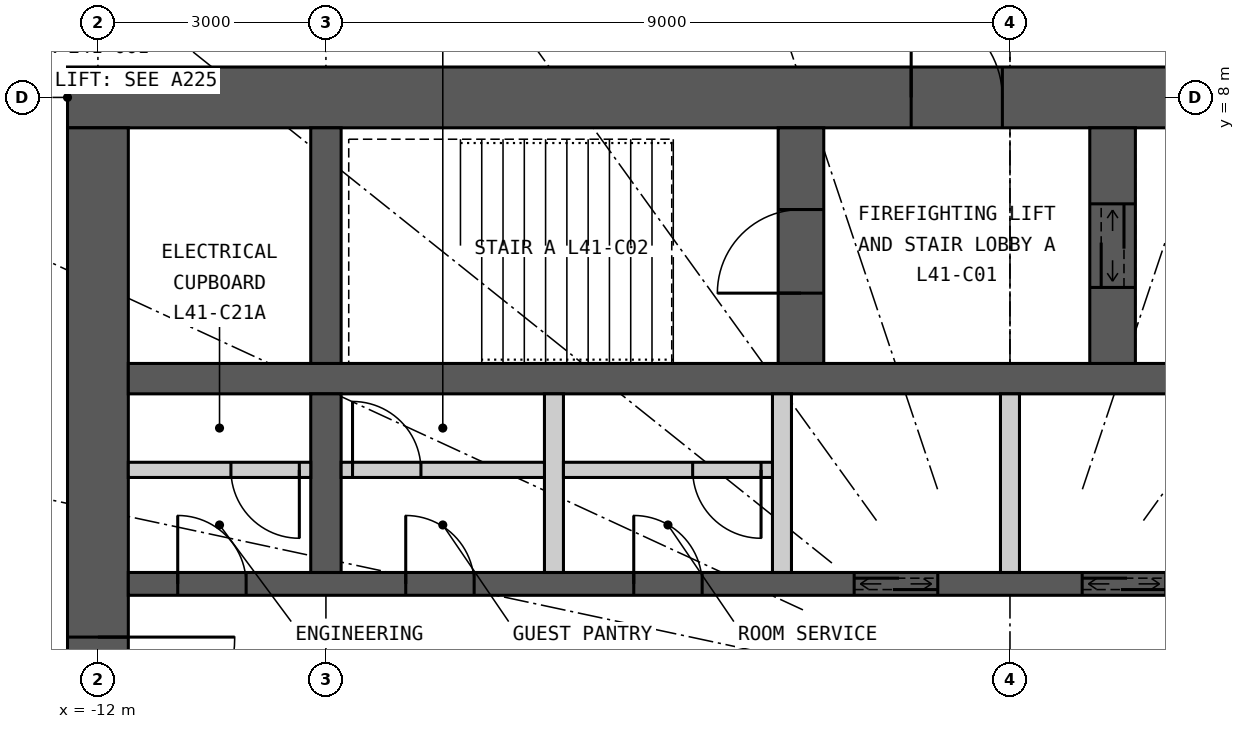
"""IFC4 building model, lengths in metres.
Left out: names, types, materials, properties, quantities, classifications, styles, units other than length and angle.
Written with IfcOpenShell. Run it as: python <this file> out.ifc"""

import sys

from ifc_helpers import new_model, si_unit, direction, frame, frame_2d, origin, place, context, subcontext, project, spatial, rectangle, extrude, element, fill, save


model = new_model("IFC4")
c1 = context("Model", 3, precision=1e-05, world=origin(), true_north=direction((0.0, 1.0)))
c2 = subcontext(c1, "Body", "Model", "MODEL_VIEW")
j1 = project(units=[si_unit("LENGTHUNIT", "METRE"), si_unit("PLANEANGLEUNIT", "RADIAN")], contexts=[c1])
p1 = place(None, origin())
s1 = spatial("IfcSite", under=j1, at=p1, CompositionType="ELEMENT")
p2 = place(p1, origin())
s2 = spatial("IfcBuilding", under=s1, at=p2, CompositionType="ELEMENT")
p3 = place(p2, frame((0.0, 0.0, 156.6)))
s3 = spatial("IfcBuildingStorey", under=s2, at=p3, CompositionType="ELEMENT", Elevation=156.6)
p4 = place(p3, frame((-12.4, 8.0, 0.0), z_axis=(0.0, 0.0, 1.0), x_axis=(1.0, 0.0, 0.0)))
e1 = element("IfcWall", 1, at=p4, inside=s3, PredefinedType="SHEAR", context=c2, shape_type="SweptSolid", body=[
    extrude(rectangle(XDim=24.8, YDim=0.8, at=frame_2d((12.4, 0.0))), origin(), (0.0, 0.0, 1.0), 3.3),
])
p5 = place(p4, frame((11.1, 0.0, 0.0)))
e2 = element("IfcOpeningElement", 2, at=p5, cuts=e1, PredefinedType="OPENING", context=c2, shape_type="SweptSolid", body=[
    extrude(rectangle(XDim=1.2, YDim=2.2, at=frame_2d((0.6, 1.1))), frame((0.0, 0.41, 0.0), z_axis=(0.0, -1.0, 0.0), x_axis=(1.0, 0.0, 0.0)), (0.0, 0.0, 1.0), 0.82),
])
p6 = place(p4, frame((18.7, 0.0, 0.0)))
e3 = element("IfcOpeningElement", 3, at=p6, cuts=e1, PredefinedType="OPENING", context=c2, shape_type="SweptSolid", body=[
    extrude(rectangle(XDim=0.9, YDim=2.2, at=frame_2d((0.45, 1.1))), frame((0.0, 0.41, 0.0), z_axis=(0.0, -1.0, 0.0), x_axis=(1.0, 0.0, 0.0)), (0.0, 0.0, 1.0), 0.82),
])
p7 = place(p3, frame((-12.0, 7.6, 0.0), z_axis=(0.0, 0.0, 1.0), x_axis=(0.0, -1.0, 0.0)))
e4 = element("IfcWall", 4, at=p7, inside=s3, PredefinedType="SHEAR", context=c2, shape_type="SweptSolid", body=[
    extrude(rectangle(XDim=15.2, YDim=0.8, at=frame_2d((7.6, 0.0))), origin(), (0.0, 0.0, 1.0), 3.3),
])
p8 = place(p7, frame((6.7, 0.0, 0.0)))
e5 = element("IfcOpeningElement", 5, at=p8, cuts=e4, PredefinedType="OPENING", context=c2, shape_type="SweptSolid", body=[
    extrude(rectangle(XDim=1.8, YDim=2.2, at=frame_2d((0.9, 1.1))), frame((0.0, 0.41, 0.0), z_axis=(0.0, -1.0, 0.0), x_axis=(1.0, 0.0, 0.0)), (0.0, 0.0, 1.0), 0.82),
])
p9 = place(p3, frame((-11.6, 4.3, 0.0), z_axis=(0.0, 0.0, 1.0), x_axis=(1.0, 0.0, 0.0)))
e6 = element("IfcWall", 6, at=p9, inside=s3, PredefinedType="SHEAR", context=c2, shape_type="SweptSolid", body=[
    extrude(rectangle(XDim=23.2, YDim=0.4, at=frame_2d((11.6, 0.0))), origin(), (0.0, 0.0, 1.0), 3.3),
])
p10 = place(p3, frame((-11.6, 1.6, 0.0), z_axis=(0.0, 0.0, 1.0), x_axis=(1.0, 0.0, 0.0)))
e7 = element("IfcWall", 7, at=p10, inside=s3, PredefinedType="SHEAR", context=c2, shape_type="SweptSolid", body=[
    extrude(rectangle(XDim=23.2, YDim=0.3, at=frame_2d((11.6, 0.0))), origin(), (0.0, 0.0, 1.0), 3.3),
])
p11 = place(p10, frame((9.55, 0.0, 0.0)))
e8 = element("IfcOpeningElement", 8, at=p11, cuts=e7, PredefinedType="OPENING", context=c2, shape_type="SweptSolid", body=[
    extrude(rectangle(XDim=1.1, YDim=2.2, at=frame_2d((0.55, 1.1))), frame((0.0, 0.16, 0.0), z_axis=(0.0, -1.0, 0.0), x_axis=(1.0, 0.0, 0.0)), (0.0, 0.0, 1.0), 0.32),
])
p12 = place(p10, frame((12.55, 0.0, 0.0)))
e9 = element("IfcOpeningElement", 9, at=p12, cuts=e7, PredefinedType="OPENING", context=c2, shape_type="SweptSolid", body=[
    extrude(rectangle(XDim=1.1, YDim=2.2, at=frame_2d((0.55, 1.1))), frame((0.0, 0.16, 0.0), z_axis=(0.0, -1.0, 0.0), x_axis=(1.0, 0.0, 0.0)), (0.0, 0.0, 1.0), 0.32),
])
p13 = place(p10, frame((0.65, 0.0, 0.0)))
e10 = element("IfcOpeningElement", 10, at=p13, cuts=e7, PredefinedType="OPENING", context=c2, shape_type="SweptSolid", body=[
    extrude(rectangle(XDim=0.9, YDim=2.2, at=frame_2d((0.45, 1.1))), frame((0.0, 0.16, 0.0), z_axis=(0.0, -1.0, 0.0), x_axis=(1.0, 0.0, 0.0)), (0.0, 0.0, 1.0), 0.32),
])
p14 = place(p10, frame((21.65, 0.0, 0.0)))
e11 = element("IfcOpeningElement", 11, at=p14, cuts=e7, PredefinedType="OPENING", context=c2, shape_type="SweptSolid", body=[
    extrude(rectangle(XDim=0.9, YDim=2.2, at=frame_2d((0.45, 1.1))), frame((0.0, 0.16, 0.0), z_axis=(0.0, -1.0, 0.0), x_axis=(1.0, 0.0, 0.0)), (0.0, 0.0, 1.0), 0.32),
])
p15 = place(p10, frame((3.65, 0.0, 0.0)))
e12 = element("IfcOpeningElement", 12, at=p15, cuts=e7, PredefinedType="OPENING", context=c2, shape_type="SweptSolid", body=[
    extrude(rectangle(XDim=0.9, YDim=2.2, at=frame_2d((0.45, 1.1))), frame((0.0, 0.16, 0.0), z_axis=(0.0, -1.0, 0.0), x_axis=(1.0, 0.0, 0.0)), (0.0, 0.0, 1.0), 0.32),
])
p16 = place(p10, frame((6.65, 0.0, 0.0)))
e13 = element("IfcOpeningElement", 13, at=p16, cuts=e7, PredefinedType="OPENING", context=c2, shape_type="SweptSolid", body=[
    extrude(rectangle(XDim=0.9, YDim=2.2, at=frame_2d((0.45, 1.1))), frame((0.0, 0.16, 0.0), z_axis=(0.0, -1.0, 0.0), x_axis=(1.0, 0.0, 0.0)), (0.0, 0.0, 1.0), 0.32),
])
p17 = place(p3, frame((-9.0, 4.5, 0.0), z_axis=(0.0, 0.0, 1.0), x_axis=(0.0, 1.0, 0.0)))
e14 = element("IfcWall", 14, at=p17, inside=s3, PredefinedType="SHEAR", context=c2, shape_type="SweptSolid", body=[
    extrude(rectangle(XDim=3.1, YDim=0.4, at=frame_2d((1.55, 0.0))), origin(), (0.0, 0.0, 1.0), 3.3),
])
p18 = place(p3, frame((-9.0, 1.75, 0.0), z_axis=(0.0, 0.0, 1.0), x_axis=(0.0, 1.0, 0.0)))
e15 = element("IfcWall", 15, at=p18, inside=s3, PredefinedType="SHEAR", context=c2, shape_type="SweptSolid", body=[
    extrude(rectangle(XDim=2.35, YDim=0.4, at=frame_2d((1.175, 0.0))), origin(), (0.0, 0.0, 1.0), 3.3),
])
p19 = place(p3, frame((-2.75, 4.5, 0.0), z_axis=(0.0, 0.0, 1.0), x_axis=(0.0, 1.0, 0.0)))
e16 = element("IfcWall", 16, at=p19, inside=s3, PredefinedType="SHEAR", context=c2, shape_type="SweptSolid", body=[
    extrude(rectangle(XDim=3.1, YDim=0.6, at=frame_2d((1.55, 0.0))), origin(), (0.0, 0.0, 1.0), 3.3),
])
p20 = place(p19, frame((0.925, 0.0, 0.0)))
e17 = element("IfcOpeningElement", 17, at=p20, cuts=e16, PredefinedType="OPENING", context=c2, shape_type="SweptSolid", body=[
    extrude(rectangle(XDim=1.1, YDim=2.2, at=frame_2d((0.55, 1.1))), frame((0.0, 0.31, 0.0), z_axis=(0.0, -1.0, 0.0), x_axis=(1.0, 0.0, 0.0)), (0.0, 0.0, 1.0), 0.62),
])
p21 = place(p3, frame((1.35, 4.5, 0.0), z_axis=(0.0, 0.0, 1.0), x_axis=(0.0, 1.0, 0.0)))
e18 = element("IfcWall", 18, at=p21, inside=s3, PredefinedType="SHEAR", context=c2, shape_type="SweptSolid", body=[
    extrude(rectangle(XDim=3.1, YDim=0.6, at=frame_2d((1.55, 0.0))), origin(), (0.0, 0.0, 1.0), 3.3),
])
p22 = place(p21, frame((1.0, 0.0, 0.0)))
e19 = element("IfcOpeningElement", 19, at=p22, cuts=e18, PredefinedType="OPENING", context=c2, shape_type="SweptSolid", body=[
    extrude(rectangle(XDim=1.1, YDim=2.2, at=frame_2d((0.55, 1.1))), frame((0.0, 0.31, 0.0), z_axis=(0.0, -1.0, 0.0), x_axis=(1.0, 0.0, 0.0)), (0.0, 0.0, 1.0), 0.62),
])
for number, where, z_axis, x_axis in (
    (20, (-6.0, 1.75, 0.0), (0.0, 0.0, 1.0), (0.0, 1.0, 0.0)),
    (21, (-3.0, 1.75, 0.0), (0.0, 0.0, 1.0), (0.0, 1.0, 0.0)),
    (22, (0.0, 1.75, 0.0), (0.0, 0.0, 1.0), (0.0, 1.0, 0.0)),
):
    element("IfcWall", number, at=place(p3, frame(where, z_axis=z_axis, x_axis=x_axis)), inside=s3, PredefinedType="PARTITIONING", context=c2, shape_type="SweptSolid", body=[
        extrude(rectangle(XDim=2.35, YDim=0.25, at=frame_2d((1.175, 0.0))), origin(), (0.0, 0.0, 1.0), 3.3),
    ])
p23 = place(p3, frame((-11.6, 3.1, 0.0), z_axis=(0.0, 0.0, 1.0), x_axis=(1.0, 0.0, 0.0)))
e23 = element("IfcWall", 23, at=p23, inside=s3, PredefinedType="PARTITIONING", context=c2, shape_type="SweptSolid", body=[
    extrude(rectangle(XDim=2.4, YDim=0.2, at=frame_2d((1.2, 0.0))), origin(), (0.0, 0.0, 1.0), 3.12),
])
p24 = place(p23, frame((1.35, 0.0, 0.0)))
e24 = element("IfcOpeningElement", 24, at=p24, cuts=e23, PredefinedType="OPENING", context=c2, shape_type="SweptSolid", body=[
    extrude(rectangle(XDim=0.9, YDim=2.2, at=frame_2d((0.45, 1.1))), frame((0.0, 0.11, 0.0), z_axis=(0.0, -1.0, 0.0), x_axis=(1.0, 0.0, 0.0)), (0.0, 0.0, 1.0), 0.22),
])
p25 = place(p3, frame((-8.8, 3.1, 0.0), z_axis=(0.0, 0.0, 1.0), x_axis=(1.0, 0.0, 0.0)))
e25 = element("IfcWall", 25, at=p25, inside=s3, PredefinedType="PARTITIONING", context=c2, shape_type="SweptSolid", body=[
    extrude(rectangle(XDim=2.675, YDim=0.2, at=frame_2d((1.337, 0.0))), origin(), (0.0, 0.0, 1.0), 3.12),
])
p26 = place(p25, frame((0.15, 0.0, 0.0)))
e26 = element("IfcOpeningElement", 26, at=p26, cuts=e25, PredefinedType="OPENING", context=c2, shape_type="SweptSolid", body=[
    extrude(rectangle(XDim=0.9, YDim=2.2, at=frame_2d((0.45, 1.1))), frame((0.0, 0.11, 0.0), z_axis=(0.0, -1.0, 0.0), x_axis=(1.0, 0.0, 0.0)), (0.0, 0.0, 1.0), 0.22),
])
p27 = place(p3, frame((-5.875, 3.1, 0.0), z_axis=(0.0, 0.0, 1.0), x_axis=(1.0, 0.0, 0.0)))
e27 = element("IfcWall", 27, at=p27, inside=s3, PredefinedType="PARTITIONING", context=c2, shape_type="SweptSolid", body=[
    extrude(rectangle(XDim=2.75, YDim=0.2, at=frame_2d((1.375, 0.0))), origin(), (0.0, 0.0, 1.0), 3.12),
])
p28 = place(p27, frame((1.7, 0.0, 0.0)))
e28 = element("IfcOpeningElement", 28, at=p28, cuts=e27, PredefinedType="OPENING", context=c2, shape_type="SweptSolid", body=[
    extrude(rectangle(XDim=0.9, YDim=2.2, at=frame_2d((0.45, 1.1))), frame((0.0, 0.11, 0.0), z_axis=(0.0, -1.0, 0.0), x_axis=(1.0, 0.0, 0.0)), (0.0, 0.0, 1.0), 0.22),
])
p29 = place(p5, origin())
e29 = element("IfcDoor", 29, at=p29, inside=s3, OperationType="SINGLE_SWING_LEFT", PredefinedType="DOOR", context=c2, shape_type="SweptSolid", body=[
    extrude(rectangle(XDim=1.2, YDim=2.2, at=frame_2d((0.6, 1.1))), frame((0.0, 0.025, 0.0), z_axis=(0.0, -1.0, 0.0), x_axis=(1.0, 0.0, 0.0)), (0.0, 0.0, 1.0), 0.05),
])
fill(e2, e29)
p30 = place(p20, origin())
e30 = element("IfcDoor", 30, at=p30, inside=s3, OperationType="SINGLE_SWING_LEFT", PredefinedType="DOOR", context=c2, shape_type="SweptSolid", body=[
    extrude(rectangle(XDim=1.1, YDim=2.2, at=frame_2d((0.55, 1.1))), frame((0.0, 0.025, 0.0), z_axis=(0.0, -1.0, 0.0), x_axis=(1.0, 0.0, 0.0)), (0.0, 0.0, 1.0), 0.05),
])
fill(e17, e30)
p31 = place(p22, origin())
e31 = element("IfcDoor", 31, at=p31, inside=s3, OperationType="DOUBLE_DOOR_SLIDING", PredefinedType="DOOR", context=c2, shape_type="SweptSolid", body=[
    extrude(rectangle(XDim=1.1, YDim=2.2, at=frame_2d((0.55, 1.1))), frame((0.0, 0.025, 0.0), z_axis=(0.0, -1.0, 0.0), x_axis=(1.0, 0.0, 0.0)), (0.0, 0.0, 1.0), 0.05),
])
fill(e19, e31)
p32 = place(p11, origin())
e32 = element("IfcDoor", 32, at=p32, inside=s3, OperationType="DOUBLE_DOOR_SLIDING", PredefinedType="DOOR", context=c2, shape_type="SweptSolid", body=[
    extrude(rectangle(XDim=1.1, YDim=2.2, at=frame_2d((0.55, 1.1))), frame((0.0, 0.025, 0.0), z_axis=(0.0, -1.0, 0.0), x_axis=(1.0, 0.0, 0.0)), (0.0, 0.0, 1.0), 0.05),
])
fill(e8, e32)
p33 = place(p12, origin())
e33 = element("IfcDoor", 33, at=p33, inside=s3, OperationType="DOUBLE_DOOR_SLIDING", PredefinedType="DOOR", context=c2, shape_type="SweptSolid", body=[
    extrude(rectangle(XDim=1.1, YDim=2.2, at=frame_2d((0.55, 1.1))), frame((0.0, 0.025, 0.0), z_axis=(0.0, -1.0, 0.0), x_axis=(1.0, 0.0, 0.0)), (0.0, 0.0, 1.0), 0.05),
])
fill(e9, e33)
p34 = place(p24, origin())
e34 = element("IfcDoor", 34, at=p34, inside=s3, OperationType="SINGLE_SWING_RIGHT", PredefinedType="DOOR", context=c2, shape_type="SweptSolid", body=[
    extrude(rectangle(XDim=0.9, YDim=2.2, at=frame_2d((0.45, 1.1))), frame((0.0, 0.025, 0.0), z_axis=(0.0, -1.0, 0.0), x_axis=(1.0, 0.0, 0.0)), (0.0, 0.0, 1.0), 0.05),
])
fill(e24, e34)
p35 = place(p13, origin())
e35 = element("IfcDoor", 35, at=p35, inside=s3, OperationType="SINGLE_SWING_LEFT", PredefinedType="DOOR", context=c2, shape_type="SweptSolid", body=[
    extrude(rectangle(XDim=0.9, YDim=2.2, at=frame_2d((0.45, 1.1))), frame((0.0, 0.025, 0.0), z_axis=(0.0, -1.0, 0.0), x_axis=(1.0, 0.0, 0.0)), (0.0, 0.0, 1.0), 0.05),
])
fill(e10, e35)
p36 = place(p15, origin())
e36 = element("IfcDoor", 36, at=p36, inside=s3, OperationType="SINGLE_SWING_LEFT", PredefinedType="DOOR", context=c2, shape_type="SweptSolid", body=[
    extrude(rectangle(XDim=0.9, YDim=2.2, at=frame_2d((0.45, 1.1))), frame((0.0, 0.025, 0.0), z_axis=(0.0, -1.0, 0.0), x_axis=(1.0, 0.0, 0.0)), (0.0, 0.0, 1.0), 0.05),
])
fill(e12, e36)
p37 = place(p26, origin())
e37 = element("IfcDoor", 37, at=p37, inside=s3, OperationType="SINGLE_SWING_LEFT", PredefinedType="DOOR", context=c2, shape_type="SweptSolid", body=[
    extrude(rectangle(XDim=0.9, YDim=2.2, at=frame_2d((0.45, 1.1))), frame((0.0, 0.025, 0.0), z_axis=(0.0, -1.0, 0.0), x_axis=(1.0, 0.0, 0.0)), (0.0, 0.0, 1.0), 0.05),
])
fill(e26, e37)
p38 = place(p16, origin())
e38 = element("IfcDoor", 38, at=p38, inside=s3, OperationType="SINGLE_SWING_LEFT", PredefinedType="DOOR", context=c2, shape_type="SweptSolid", body=[
    extrude(rectangle(XDim=0.9, YDim=2.2, at=frame_2d((0.45, 1.1))), frame((0.0, 0.025, 0.0), z_axis=(0.0, -1.0, 0.0), x_axis=(1.0, 0.0, 0.0)), (0.0, 0.0, 1.0), 0.05),
])
fill(e13, e38)
p39 = place(p28, origin())
e39 = element("IfcDoor", 39, at=p39, inside=s3, OperationType="SINGLE_SWING_RIGHT", PredefinedType="DOOR", context=c2, shape_type="SweptSolid", body=[
    extrude(rectangle(XDim=0.9, YDim=2.2, at=frame_2d((0.45, 1.1))), frame((0.0, 0.025, 0.0), z_axis=(0.0, -1.0, 0.0), x_axis=(1.0, 0.0, 0.0)), (0.0, 0.0, 1.0), 0.05),
])
fill(e28, e39)
p40 = place(p8, origin())
e40 = element("IfcDoor", 40, at=p40, inside=s3, OperationType="DOUBLE_DOOR_DOUBLE_SWING", PredefinedType="DOOR", context=c2, shape_type="SweptSolid", body=[
    extrude(rectangle(XDim=1.8, YDim=2.2, at=frame_2d((0.9, 1.1))), frame((0.0, 0.025, 0.0), z_axis=(0.0, -1.0, 0.0), x_axis=(1.0, 0.0, 0.0)), (0.0, 0.0, 1.0), 0.05),
])
fill(e5, e40)
save(model, sys.argv[1])
